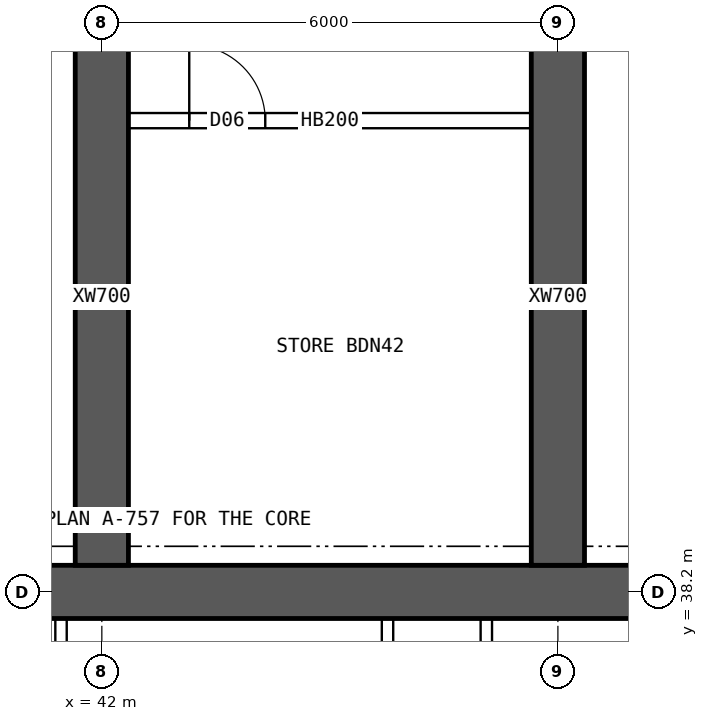
"""IFC4 building model, lengths in metres.
Left out: names, types, materials, properties, quantities, classifications, styles, units other than length and angle.
Written with IfcOpenShell. Run it as: python <this file> out.ifc"""

import sys

from ifc_helpers import new_model, si_unit, direction, frame, frame_2d, origin, place, context, subcontext, project, spatial, rectangle, extrude, element, fill, save


model = new_model("IFC4")
c1 = context("Model", 3, precision=1e-05, world=origin(), true_north=direction((0.0, 1.0)))
c2 = subcontext(c1, "Body", "Model", "MODEL_VIEW")
j1 = project(units=[si_unit("LENGTHUNIT", "METRE"), si_unit("PLANEANGLEUNIT", "RADIAN")], contexts=[c1])
p1 = place(None, origin())
s1 = spatial("IfcSite", under=j1, at=p1, CompositionType="ELEMENT")
p2 = place(p1, origin())
s2 = spatial("IfcBuilding", under=s1, at=p2, CompositionType="ELEMENT")
p3 = place(p2, frame((0.0, 0.0, 220.3)))
s3 = spatial("IfcBuildingStorey", under=s2, at=p3, CompositionType="ELEMENT", Elevation=220.3)
p4 = place(p3, frame((18.0, 38.2, 0.0), z_axis=(0.0, 0.0, 1.0), x_axis=(1.0, 0.0, 0.0)))
e1 = element("IfcWall", 1, at=p4, inside=s3, PredefinedType="SHEAR", context=c2, shape_type="SweptSolid", body=[
    extrude(rectangle(XDim=48.0, YDim=0.7, at=frame_2d((24.0, 0.0))), origin(), (0.0, 0.0, 1.0), 3.75),
])
for number, where, z_axis, x_axis in (
    (2, (42.0, 38.55, 0.0), (0.0, 0.0, 1.0), (0.0, 1.0, 0.0)),
    (3, (48.0, 38.55, 0.0), (0.0, 0.0, 1.0), (0.0, 1.0, 0.0)),
):
    element("IfcWall", number, at=place(p3, frame(where, z_axis=z_axis, x_axis=x_axis)), inside=s3, PredefinedType="SHEAR", context=c2, shape_type="SweptSolid", body=[
        extrude(rectangle(XDim=7.05, YDim=0.7, at=frame_2d((3.525, 0.0))), origin(), (0.0, 0.0, 1.0), 3.75),
    ])
for number, where, z_axis, x_axis in (
    (4, (41.463, 34.75, 0.0), (0.0, 0.0, 1.0), (0.0, 1.0, 0.0)),
    (5, (45.758, 34.75, 0.0), (0.0, 0.0, 1.0), (0.0, 1.0, 0.0)),
    (6, (47.058, 34.75, 0.0), (0.0, 0.0, 1.0), (0.0, 1.0, 0.0)),
):
    element("IfcWall", number, at=place(p3, frame(where, z_axis=z_axis, x_axis=x_axis)), inside=s3, PredefinedType="SOLIDWALL", context=c2, shape_type="SweptSolid", body=[
        extrude(rectangle(XDim=3.1, YDim=0.15, at=frame_2d((1.55, 0.0))), origin(), (0.0, 0.0, 1.0), 3.5),
    ])
p5 = place(p3, frame((42.35, 44.4, 0.0), z_axis=(0.0, 0.0, 1.0), x_axis=(1.0, 0.0, 0.0)))
e7 = element("IfcWall", 7, at=p5, inside=s3, PredefinedType="SOLIDWALL", context=c2, shape_type="SweptSolid", body=[
    extrude(rectangle(XDim=5.3, YDim=0.2, at=frame_2d((2.65, 0.0))), origin(), (0.0, 0.0, 1.0), 3.5),
])
p6 = place(p5, frame((0.8, 0.0, 0.0)))
e8 = element("IfcOpeningElement", 8, at=p6, cuts=e7, PredefinedType="OPENING", context=c2, shape_type="SweptSolid", body=[
    extrude(rectangle(XDim=1.0, YDim=2.1, at=frame_2d((0.5, 1.05))), frame((0.0, 0.11, 0.0), z_axis=(0.0, -1.0, 0.0), x_axis=(1.0, 0.0, 0.0)), (0.0, 0.0, 1.0), 0.22),
])
p7 = place(p6, origin())
e9 = element("IfcDoor", 9, at=p7, inside=s3, OperationType="SINGLE_SWING_LEFT", PredefinedType="DOOR", context=c2, shape_type="SweptSolid", body=[
    extrude(rectangle(XDim=1.0, YDim=2.1, at=frame_2d((0.5, 1.05))), frame((0.0, 0.025, 0.0), z_axis=(0.0, -1.0, 0.0), x_axis=(1.0, 0.0, 0.0)), (0.0, 0.0, 1.0), 0.05),
])
fill(e8, e9)
save(model, sys.argv[1])
